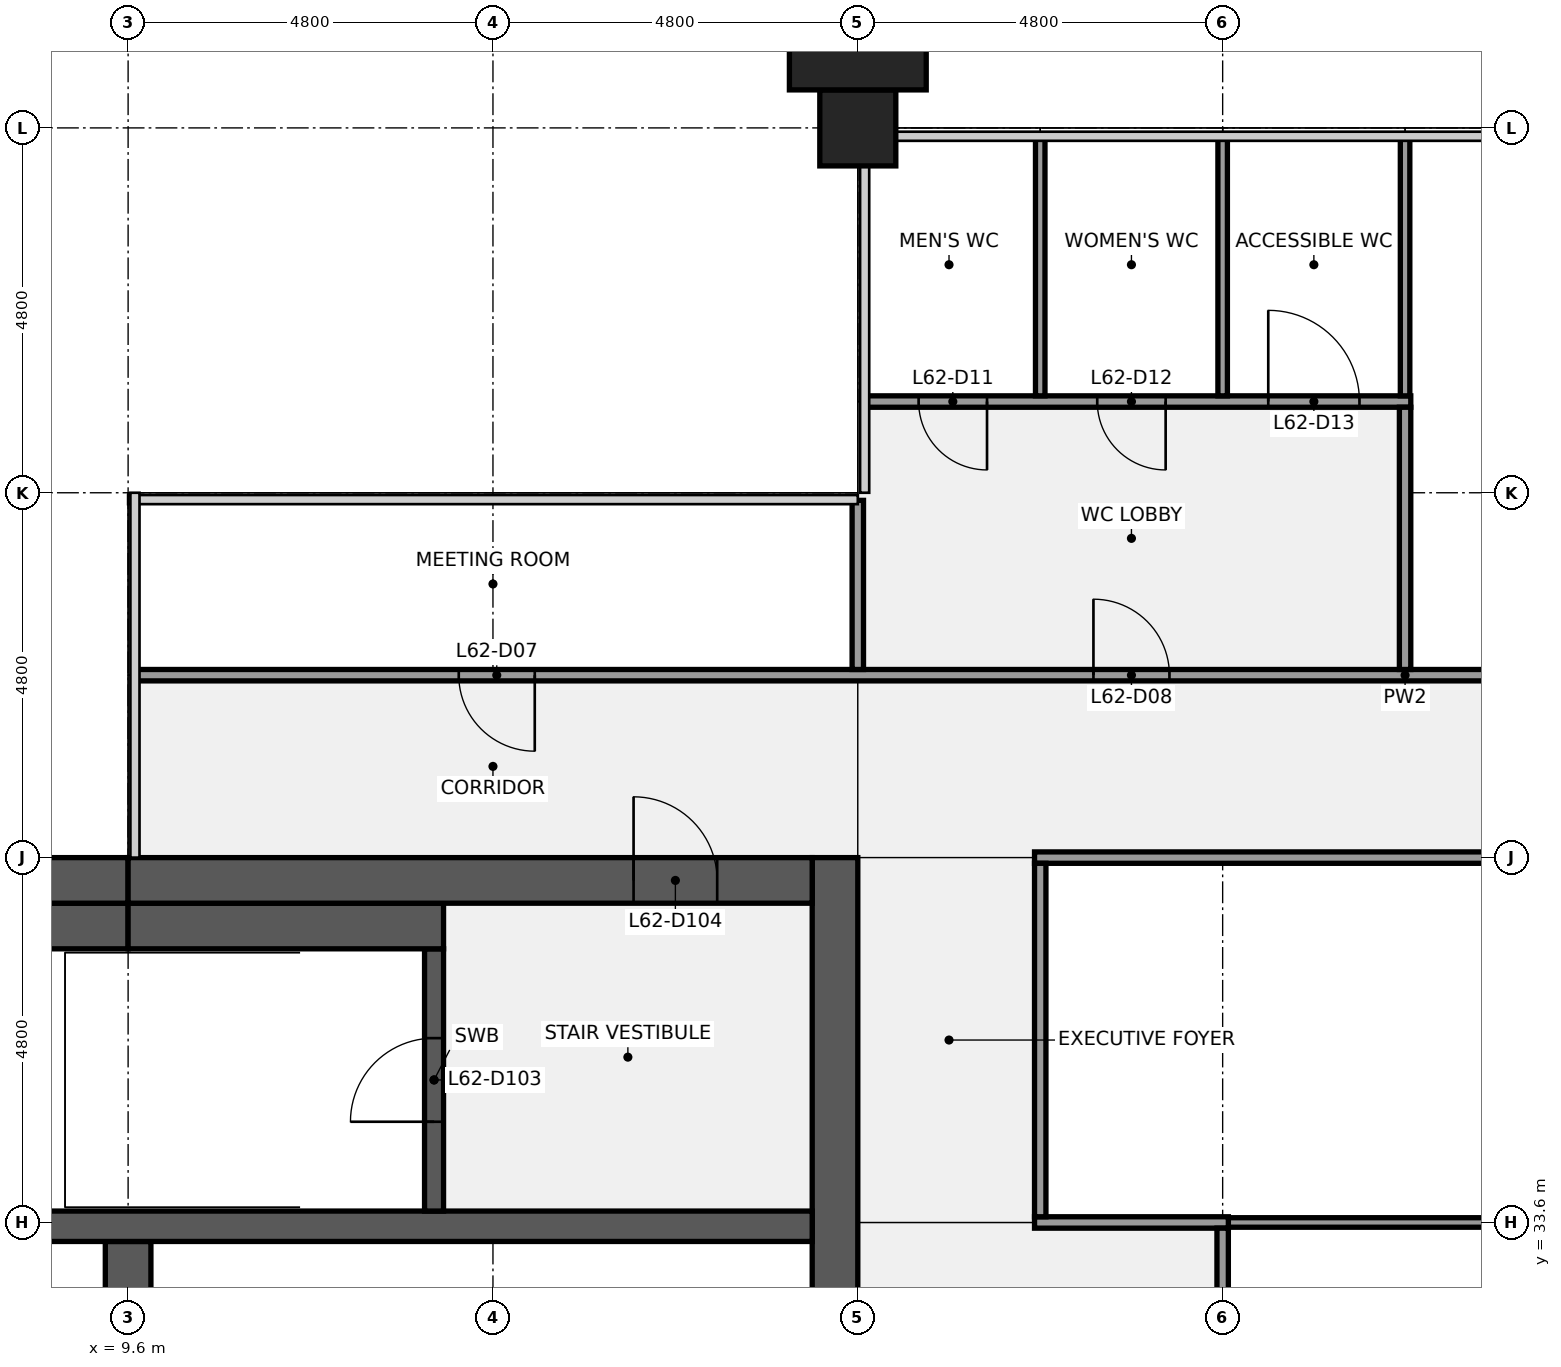
"""IFC4 building model, lengths in metres.
Left out: names, types, materials, properties, quantities, classifications, styles, units other than length and angle.
Written with IfcOpenShell. Run it as: python <this file> out.ifc"""

import sys

from ifc_helpers import new_model, si_unit, direction, frame, frame_2d, origin, origin_2d, place, context, subcontext, project, spatial, rectangle, extrude, element, fill, save


model = new_model("IFC4")
c1 = context("Model", 3, precision=1e-05, world=origin(), true_north=direction((0.0, 1.0)))
c2 = subcontext(c1, "Body", "Model", "MODEL_VIEW")
j1 = project(units=[si_unit("LENGTHUNIT", "METRE"), si_unit("PLANEANGLEUNIT", "RADIAN")], contexts=[c1])
p1 = place(None, origin())
s1 = spatial("IfcSite", under=j1, at=p1, CompositionType="ELEMENT")
p2 = place(p1, origin())
s2 = spatial("IfcBuilding", under=s1, at=p2, CompositionType="ELEMENT")
p3 = place(p2, frame((0.0, 0.0, 286.3)))
s3 = spatial("IfcBuildingStorey", under=s2, at=p3, CompositionType="ELEMENT", Elevation=286.3)
p4 = place(p3, frame((19.2, 48.0, 0.0), z_axis=(0.0, 0.0, 1.0), x_axis=(1.0, 0.0, 0.0)))
e1 = element("IfcColumn", 1, at=p4, inside=s3, PredefinedType="COLUMN", context=c2, shape_type="SweptSolid", body=[
    extrude(rectangle(XDim=1.0, YDim=1.0, at=origin_2d()), origin(), (0.0, 0.0, 1.0), 4.0),
])
p5 = place(p3, frame((18.9, 38.4, 0.0), z_axis=(0.0, 0.0, 1.0), x_axis=(0.0, -1.0, 0.0)))
e2 = element("IfcWall", 2, at=p5, inside=s3, PredefinedType="SHEAR", context=c2, shape_type="SweptSolid", body=[
    extrude(rectangle(XDim=28.8, YDim=0.6, at=frame_2d((14.4, 0.0))), origin(), (0.0, 0.0, 1.0), 3.84),
])
p6 = place(p5, frame((18.3, 0.0, 0.0)))
e3 = element("IfcOpeningElement", 3, at=p6, cuts=e2, PredefinedType="OPENING", context=c2, shape_type="SweptSolid", body=[
    extrude(rectangle(XDim=1.8, YDim=2.1, at=frame_2d((0.9, 1.05))), frame((0.0, 0.31, 0.0), z_axis=(0.0, -1.0, 0.0), x_axis=(1.0, 0.0, 0.0)), (0.0, 0.0, 1.0), 0.62),
])
p7 = place(p5, frame((8.7, 0.0, 0.0)))
e4 = element("IfcOpeningElement", 4, at=p7, cuts=e2, PredefinedType="OPENING", context=c2, shape_type="SweptSolid", body=[
    extrude(rectangle(XDim=1.8, YDim=2.1, at=frame_2d((0.9, 1.05))), frame((0.0, 0.31, 0.0), z_axis=(0.0, -1.0, 0.0), x_axis=(1.0, 0.0, 0.0)), (0.0, 0.0, 1.0), 0.62),
])
p8 = place(p3, frame((9.6, 30.75, 0.0), z_axis=(0.0, 0.0, 1.0), x_axis=(0.0, 1.0, 0.0)))
e5 = element("IfcWall", 5, at=p8, inside=s3, PredefinedType="SHEAR", context=c2, shape_type="SweptSolid", body=[
    extrude(rectangle(XDim=2.6, YDim=0.6, at=frame_2d((1.3, 0.0))), origin(), (0.0, 0.0, 1.0), 3.84),
])
p9 = place(p3, frame((0.6, 33.55, 0.0), z_axis=(0.0, 0.0, 1.0), x_axis=(1.0, 0.0, 0.0)))
e6 = element("IfcWall", 6, at=p9, inside=s3, PredefinedType="SHEAR", context=c2, shape_type="SweptSolid", body=[
    extrude(rectangle(XDim=18.0, YDim=0.4, at=frame_2d((9.0, 0.0))), origin(), (0.0, 0.0, 1.0), 3.84),
])
p10 = place(p3, frame((13.625, 33.75, 0.0), z_axis=(0.0, 0.0, 1.0), x_axis=(0.0, 1.0, 0.0)))
e7 = element("IfcWall", 7, at=p10, inside=s3, PredefinedType="SHEAR", context=c2, shape_type="SweptSolid", body=[
    extrude(rectangle(XDim=3.45, YDim=0.25, at=frame_2d((1.725, 0.0))), origin(), (0.0, 0.0, 1.0), 3.84),
])
p11 = place(p10, frame((1.175, 0.0, 0.0)))
e8 = element("IfcOpeningElement", 8, at=p11, cuts=e7, PredefinedType="OPENING", context=c2, shape_type="SweptSolid", body=[
    extrude(rectangle(XDim=1.1, YDim=2.1, at=frame_2d((0.55, 1.05))), frame((0.0, 0.135, 0.0), z_axis=(0.0, -1.0, 0.0), x_axis=(1.0, 0.0, 0.0)), (0.0, 0.0, 1.0), 0.27),
])
p12 = place(p3, frame((6.25, 37.5, 0.0), z_axis=(0.0, 0.0, 1.0), x_axis=(1.0, 0.0, 0.0)))
e9 = element("IfcWall", 9, at=p12, inside=s3, PredefinedType="SHEAR", context=c2, shape_type="SweptSolid", body=[
    extrude(rectangle(XDim=3.35, YDim=0.6, at=frame_2d((1.675, 0.0))), origin(), (0.0, 0.0, 1.0), 3.84),
])
p13 = place(p3, frame((9.6, 37.5, 0.0), z_axis=(0.0, 0.0, 1.0), x_axis=(1.0, 0.0, 0.0)))
e10 = element("IfcWall", 10, at=p13, inside=s3, PredefinedType="SHEAR", context=c2, shape_type="SweptSolid", body=[
    extrude(rectangle(XDim=4.15, YDim=0.6, at=frame_2d((2.075, 0.0))), origin(), (0.0, 0.0, 1.0), 3.84),
])
p14 = place(p3, frame((0.6, 38.1, 0.0), z_axis=(0.0, 0.0, 1.0), x_axis=(1.0, 0.0, 0.0)))
e11 = element("IfcWall", 11, at=p14, inside=s3, PredefinedType="SHEAR", context=c2, shape_type="SweptSolid", body=[
    extrude(rectangle(XDim=9.0, YDim=0.6, at=frame_2d((4.5, 0.0))), origin(), (0.0, 0.0, 1.0), 3.84),
])
p15 = place(p14, frame((5.7, 0.0, 0.9)))
e12 = element("IfcOpeningElement", 12, at=p15, cuts=e11, PredefinedType="OPENING", context=c2, shape_type="SweptSolid", body=[
    extrude(rectangle(XDim=1.8, YDim=1.5, at=frame_2d((0.9, 0.75))), frame((0.0, 0.31, 0.0), z_axis=(0.0, -1.0, 0.0), x_axis=(1.0, 0.0, 0.0)), (0.0, 0.0, 1.0), 0.62),
])
p16 = place(p3, frame((9.6, 38.1, 0.0), z_axis=(0.0, 0.0, 1.0), x_axis=(1.0, 0.0, 0.0)))
e13 = element("IfcWall", 13, at=p16, inside=s3, PredefinedType="SHEAR", context=c2, shape_type="SweptSolid", body=[
    extrude(rectangle(XDim=9.0, YDim=0.6, at=frame_2d((4.5, 0.0))), origin(), (0.0, 0.0, 1.0), 3.84),
])
p17 = place(p16, frame((6.65, 0.0, 0.0)))
e14 = element("IfcOpeningElement", 14, at=p17, cuts=e13, PredefinedType="OPENING", context=c2, shape_type="SweptSolid", body=[
    extrude(rectangle(XDim=1.1, YDim=2.1, at=frame_2d((0.55, 1.05))), frame((0.0, 0.31, 0.0), z_axis=(0.0, -1.0, 0.0), x_axis=(1.0, 0.0, 0.0)), (0.0, 0.0, 1.0), 0.62),
])
p18 = place(p3, frame((24.075, 33.6, 0.0), z_axis=(0.0, 0.0, 1.0), x_axis=(1.0, 0.0, 0.0)))
e15 = element("IfcWall", 15, at=p18, inside=s3, PredefinedType="PARTITIONING", context=c2, shape_type="SweptSolid", body=[
    extrude(rectangle(XDim=9.6, YDim=0.125, at=frame_2d((4.8, 0.0))), origin(), (0.0, 0.0, 1.0), 2.849),
])
p19 = place(p3, frame((21.525, 33.6, 0.0), z_axis=(0.0, 0.0, 1.0), x_axis=(1.0, 0.0, 0.0)))
e16 = element("IfcWall", 16, at=p19, inside=s3, PredefinedType="PARTITIONING", context=c2, shape_type="SweptSolid", body=[
    extrude(rectangle(XDim=2.55, YDim=0.15, at=frame_2d((1.275, 0.0))), origin(), (0.0, 0.0, 1.0), 2.849),
])
p20 = place(p3, frame((21.525, 38.4, 0.0), z_axis=(0.0, 0.0, 1.0), x_axis=(1.0, 0.0, 0.0)))
e17 = element("IfcWall", 17, at=p20, inside=s3, PredefinedType="PARTITIONING", context=c2, shape_type="SweptSolid", body=[
    extrude(rectangle(XDim=14.55, YDim=0.15, at=frame_2d((7.275, 0.0))), origin(), (0.0, 0.0, 1.0), 2.849),
])
p21 = place(p20, frame((6.775, 0.0, 0.0)))
e18 = element("IfcOpeningElement", 18, at=p21, cuts=e17, PredefinedType="OPENING", context=c2, shape_type="SweptSolid", body=[
    extrude(rectangle(XDim=1.0, YDim=2.1, at=frame_2d((0.5, 1.05))), frame((0.0, 0.085, 0.0), z_axis=(0.0, -1.0, 0.0), x_axis=(1.0, 0.0, 0.0)), (0.0, 0.0, 1.0), 0.17),
])
p22 = place(p3, frame((9.7, 40.8, 0.0), z_axis=(0.0, 0.0, 1.0), x_axis=(1.0, 0.0, 0.0)))
e19 = element("IfcWall", 19, at=p22, inside=s3, PredefinedType="PARTITIONING", context=c2, shape_type="SweptSolid", body=[
    extrude(rectangle(XDim=33.4, YDim=0.15, at=frame_2d((16.7, 0.0))), origin(), (0.0, 0.0, 1.0), 2.849),
])
p23 = place(p22, frame((4.25, 0.0, 0.0)))
e20 = element("IfcOpeningElement", 20, at=p23, cuts=e19, PredefinedType="OPENING", context=c2, shape_type="SweptSolid", body=[
    extrude(rectangle(XDim=1.0, YDim=2.1, at=frame_2d((0.5, 1.05))), frame((0.0, 0.085, 0.0), z_axis=(0.0, -1.0, 0.0), x_axis=(1.0, 0.0, 0.0)), (0.0, 0.0, 1.0), 0.17),
])
p24 = place(p22, frame((12.6, 0.0, 0.0)))
e21 = element("IfcOpeningElement", 21, at=p24, cuts=e19, PredefinedType="OPENING", context=c2, shape_type="SweptSolid", body=[
    extrude(rectangle(XDim=1.0, YDim=2.1, at=frame_2d((0.5, 1.05))), frame((0.0, 0.085, 0.0), z_axis=(0.0, -1.0, 0.0), x_axis=(1.0, 0.0, 0.0)), (0.0, 0.0, 1.0), 0.17),
])
p25 = place(p22, frame((22.2, 0.0, 0.0)))
e22 = element("IfcOpeningElement", 22, at=p25, cuts=e19, PredefinedType="OPENING", context=c2, shape_type="SweptSolid", body=[
    extrude(rectangle(XDim=1.0, YDim=2.1, at=frame_2d((0.5, 1.05))), frame((0.0, 0.085, 0.0), z_axis=(0.0, -1.0, 0.0), x_axis=(1.0, 0.0, 0.0)), (0.0, 0.0, 1.0), 0.17),
])
p26 = place(p22, frame((30.55, 0.0, 0.0)))
e23 = element("IfcOpeningElement", 23, at=p26, cuts=e19, PredefinedType="OPENING", context=c2, shape_type="SweptSolid", body=[
    extrude(rectangle(XDim=1.0, YDim=2.1, at=frame_2d((0.5, 1.05))), frame((0.0, 0.085, 0.0), z_axis=(0.0, -1.0, 0.0), x_axis=(1.0, 0.0, 0.0)), (0.0, 0.0, 1.0), 0.17),
])
p27 = place(p3, frame((19.3, 44.4, 0.0), z_axis=(0.0, 0.0, 1.0), x_axis=(1.0, 0.0, 0.0)))
e24 = element("IfcWall", 24, at=p27, inside=s3, PredefinedType="PARTITIONING", context=c2, shape_type="SweptSolid", body=[
    extrude(rectangle(XDim=7.175, YDim=0.15, at=frame_2d((3.587, 0.0))), origin(), (0.0, 0.0, 1.0), 2.849),
])
p28 = place(p27, frame((0.7, 0.0, 0.0)))
e25 = element("IfcOpeningElement", 25, at=p28, cuts=e24, PredefinedType="OPENING", context=c2, shape_type="SweptSolid", body=[
    extrude(rectangle(XDim=0.9, YDim=2.1, at=frame_2d((0.45, 1.05))), frame((0.0, 0.085, 0.0), z_axis=(0.0, -1.0, 0.0), x_axis=(1.0, 0.0, 0.0)), (0.0, 0.0, 1.0), 0.17),
])
p29 = place(p27, frame((3.05, 0.0, 0.0)))
e26 = element("IfcOpeningElement", 26, at=p29, cuts=e24, PredefinedType="OPENING", context=c2, shape_type="SweptSolid", body=[
    extrude(rectangle(XDim=0.9, YDim=2.1, at=frame_2d((0.45, 1.05))), frame((0.0, 0.085, 0.0), z_axis=(0.0, -1.0, 0.0), x_axis=(1.0, 0.0, 0.0)), (0.0, 0.0, 1.0), 0.17),
])
p30 = place(p27, frame((5.3, 0.0, 0.0)))
e27 = element("IfcOpeningElement", 27, at=p30, cuts=e24, PredefinedType="OPENING", context=c2, shape_type="SweptSolid", body=[
    extrude(rectangle(XDim=1.2, YDim=2.1, at=frame_2d((0.6, 1.05))), frame((0.0, 0.085, 0.0), z_axis=(0.0, -1.0, 0.0), x_axis=(1.0, 0.0, 0.0)), (0.0, 0.0, 1.0), 0.17),
])
p31 = place(p3, frame((19.2, 40.875, 0.0), z_axis=(0.0, 0.0, 1.0), x_axis=(0.0, 1.0, 0.0)))
e28 = element("IfcWall", 28, at=p31, inside=s3, PredefinedType="PARTITIONING", context=c2, shape_type="SweptSolid", body=[
    extrude(rectangle(XDim=2.225, YDim=0.15, at=frame_2d((1.113, 0.0))), origin(), (0.0, 0.0, 1.0), 2.849),
])
p32 = place(p3, frame((21.6, 44.475, 0.0), z_axis=(0.0, 0.0, 1.0), x_axis=(0.0, 1.0, 0.0)))
e29 = element("IfcWall", 29, at=p32, inside=s3, PredefinedType="PARTITIONING", context=c2, shape_type="SweptSolid", body=[
    extrude(rectangle(XDim=3.425, YDim=0.125, at=frame_2d((1.712, 0.0))), origin(), (0.0, 0.0, 1.0), 2.849),
])
p33 = place(p3, frame((21.6, 33.675, 0.0), z_axis=(0.0, 0.0, 1.0), x_axis=(0.0, 1.0, 0.0)))
e30 = element("IfcWall", 30, at=p33, inside=s3, PredefinedType="PARTITIONING", context=c2, shape_type="SweptSolid", body=[
    extrude(rectangle(XDim=4.65, YDim=0.15, at=frame_2d((2.325, 0.0))), origin(), (0.0, 0.0, 1.0), 2.849),
])
p34 = place(p3, frame((24.0, 44.475, 0.0), z_axis=(0.0, 0.0, 1.0), x_axis=(0.0, 1.0, 0.0)))
e31 = element("IfcWall", 31, at=p34, inside=s3, PredefinedType="PARTITIONING", context=c2, shape_type="SweptSolid", body=[
    extrude(rectangle(XDim=3.425, YDim=0.125, at=frame_2d((1.712, 0.0))), origin(), (0.0, 0.0, 1.0), 2.849),
])
p35 = place(p3, frame((24.0, 28.875, 0.0), z_axis=(0.0, 0.0, 1.0), x_axis=(0.0, 1.0, 0.0)))
e32 = element("IfcWall", 32, at=p35, inside=s3, PredefinedType="PARTITIONING", context=c2, shape_type="SweptSolid", body=[
    extrude(rectangle(XDim=4.65, YDim=0.15, at=frame_2d((2.325, 0.0))), origin(), (0.0, 0.0, 1.0), 2.849),
])
p36 = place(p3, frame((26.4, 44.475, 0.0), z_axis=(0.0, 0.0, 1.0), x_axis=(0.0, 1.0, 0.0)))
e33 = element("IfcWall", 33, at=p36, inside=s3, PredefinedType="PARTITIONING", context=c2, shape_type="SweptSolid", body=[
    extrude(rectangle(XDim=3.425, YDim=0.125, at=frame_2d((1.712, 0.0))), origin(), (0.0, 0.0, 1.0), 2.849),
])
p37 = place(p3, frame((26.4, 40.875, 0.0), z_axis=(0.0, 0.0, 1.0), x_axis=(0.0, 1.0, 0.0)))
e34 = element("IfcWall", 34, at=p37, inside=s3, PredefinedType="PARTITIONING", context=c2, shape_type="SweptSolid", body=[
    extrude(rectangle(XDim=3.45, YDim=0.15, at=frame_2d((1.725, 0.0))), origin(), (0.0, 0.0, 1.0), 2.849),
])
p38 = place(p3, frame((19.2, 49.0, 0.0), z_axis=(0.0, 0.0, 1.0), x_axis=(1.0, 0.0, 0.0)))
e35 = element("IfcColumn", 35, at=p38, inside=s3, PredefinedType="PILASTER", context=c2, shape_type="SweptSolid", body=[
    extrude(rectangle(XDim=1.8, YDim=1.0, at=origin_2d()), origin(), (0.0, 0.0, 1.0), 4.0),
])
p39 = place(p11, origin())
e36 = element("IfcDoor", 36, at=p39, inside=s3, OperationType="SINGLE_SWING_LEFT", PredefinedType="DOOR", context=c2, shape_type="SweptSolid", body=[
    extrude(rectangle(XDim=1.1, YDim=2.1, at=frame_2d((0.55, 1.05))), frame((0.0, 0.025, 0.0), z_axis=(0.0, -1.0, 0.0), x_axis=(1.0, 0.0, 0.0)), (0.0, 0.0, 1.0), 0.05),
])
fill(e8, e36)
p40 = place(p17, origin())
e37 = element("IfcDoor", 37, at=p40, inside=s3, OperationType="SINGLE_SWING_LEFT", PredefinedType="DOOR", context=c2, shape_type="SweptSolid", body=[
    extrude(rectangle(XDim=1.1, YDim=2.1, at=frame_2d((0.55, 1.05))), frame((0.0, 0.025, 0.0), z_axis=(0.0, -1.0, 0.0), x_axis=(1.0, 0.0, 0.0)), (0.0, 0.0, 1.0), 0.05),
])
fill(e14, e37)
p41 = place(p23, origin())
e38 = element("IfcDoor", 38, at=p41, inside=s3, OperationType="SINGLE_SWING_RIGHT", PredefinedType="DOOR", context=c2, shape_type="SweptSolid", body=[
    extrude(rectangle(XDim=1.0, YDim=2.1, at=frame_2d((0.5, 1.05))), frame((0.0, 0.025, 0.0), z_axis=(0.0, -1.0, 0.0), x_axis=(1.0, 0.0, 0.0)), (0.0, 0.0, 1.0), 0.05),
])
fill(e20, e38)
p42 = place(p24, origin())
e39 = element("IfcDoor", 39, at=p42, inside=s3, OperationType="SINGLE_SWING_LEFT", PredefinedType="DOOR", context=c2, shape_type="SweptSolid", body=[
    extrude(rectangle(XDim=1.0, YDim=2.1, at=frame_2d((0.5, 1.05))), frame((0.0, 0.025, 0.0), z_axis=(0.0, -1.0, 0.0), x_axis=(1.0, 0.0, 0.0)), (0.0, 0.0, 1.0), 0.05),
])
fill(e21, e39)
p43 = place(p28, origin())
e40 = element("IfcDoor", 40, at=p43, inside=s3, OperationType="SINGLE_SWING_RIGHT", PredefinedType="DOOR", context=c2, shape_type="SweptSolid", body=[
    extrude(rectangle(XDim=0.9, YDim=2.1, at=frame_2d((0.45, 1.05))), frame((0.0, 0.025, 0.0), z_axis=(0.0, -1.0, 0.0), x_axis=(1.0, 0.0, 0.0)), (0.0, 0.0, 1.0), 0.05),
])
fill(e25, e40)
p44 = place(p29, origin())
e41 = element("IfcDoor", 41, at=p44, inside=s3, OperationType="SINGLE_SWING_RIGHT", PredefinedType="DOOR", context=c2, shape_type="SweptSolid", body=[
    extrude(rectangle(XDim=0.9, YDim=2.1, at=frame_2d((0.45, 1.05))), frame((0.0, 0.025, 0.0), z_axis=(0.0, -1.0, 0.0), x_axis=(1.0, 0.0, 0.0)), (0.0, 0.0, 1.0), 0.05),
])
fill(e26, e41)
p45 = place(p30, origin())
e42 = element("IfcDoor", 42, at=p45, inside=s3, OperationType="SINGLE_SWING_LEFT", PredefinedType="DOOR", context=c2, shape_type="SweptSolid", body=[
    extrude(rectangle(XDim=1.2, YDim=2.1, at=frame_2d((0.6, 1.05))), frame((0.0, 0.025, 0.0), z_axis=(0.0, -1.0, 0.0), x_axis=(1.0, 0.0, 0.0)), (0.0, 0.0, 1.0), 0.05),
])
fill(e27, e42)
save(model, sys.argv[1])
